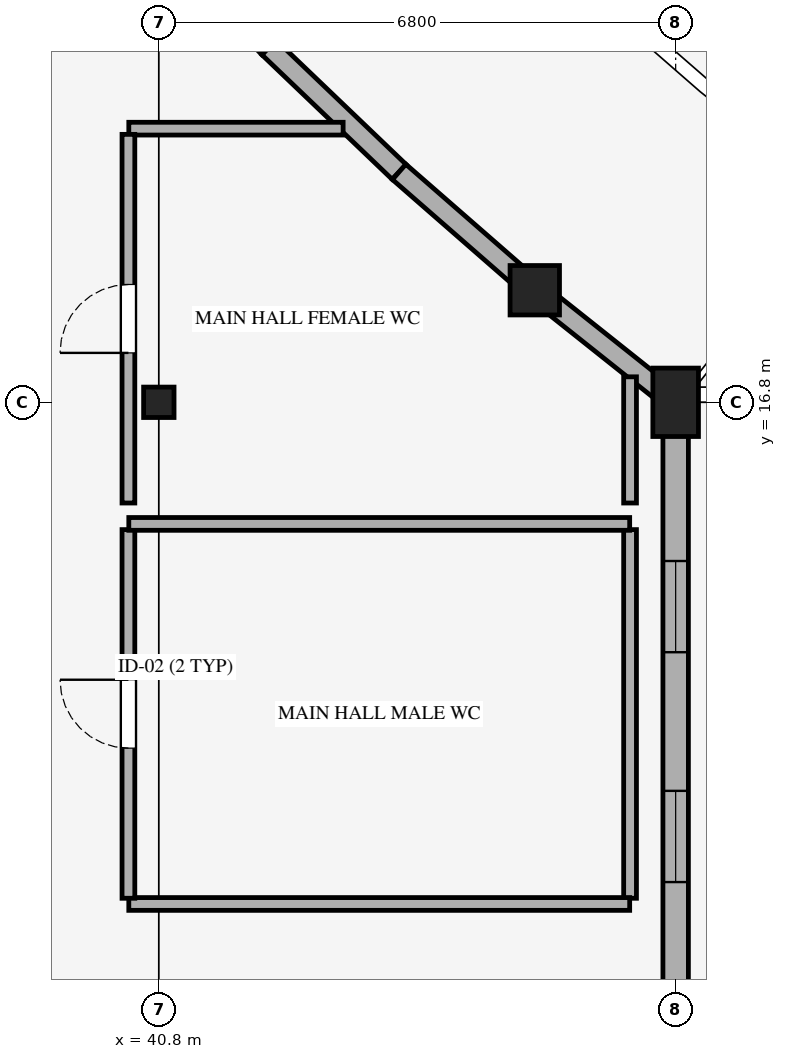
"""IFC4 building model, lengths in metres.
Left out: names, types, materials, properties, quantities, classifications, styles, units other than length and angle.
Written with IfcOpenShell. Run it as: python <this file> out.ifc"""

import sys

from ifc_helpers import new_model, si_unit, direction, frame, frame_2d, origin, origin_2d, place, context, subcontext, project, spatial, rectangle, circle, i_section, extrude, element, fill, save


model = new_model("IFC4")
c1 = context("Model", 3, precision=1e-05, world=origin(), true_north=direction((0.0, 1.0)))
c2 = subcontext(c1, "Body", "Model", "MODEL_VIEW")
j1 = project(units=[si_unit("LENGTHUNIT", "METRE"), si_unit("PLANEANGLEUNIT", "RADIAN")], contexts=[c1])
p1 = place(None, origin())
s1 = spatial("IfcSite", under=j1, at=p1, CompositionType="ELEMENT")
p2 = place(p1, origin())
s2 = spatial("IfcBuilding", under=s1, at=p2, CompositionType="ELEMENT")
p3 = place(p2, origin())
s3 = spatial("IfcBuildingStorey", under=s2, at=p3, CompositionType="ELEMENT", Elevation=0.0)
p4 = place(p3, frame((40.8, 16.8, 0.0), z_axis=(0.0, 0.0, 1.0), x_axis=(1.0, 0.0, 0.0)))
e1 = element("IfcColumn", 1, at=p4, inside=s3, PredefinedType="COLUMN", context=c2, shape_type="SweptSolid", body=[
    extrude(i_section(OverallWidth=0.4, OverallDepth=0.4, WebThickness=0.013, FlangeThickness=0.021, FilletRadius=0.022, at=origin_2d()), origin(), (0.0, 0.0, 1.0), 4.8),
])
p5 = place(p3, frame((45.746, 18.274, 0.0), z_axis=(0.0, 0.0, 1.0), x_axis=(1.0, 0.0, 0.0)))
e2 = element("IfcColumn", 2, at=p5, inside=s3, PredefinedType="COLUMN", context=c2, shape_type="SweptSolid", body=[
    extrude(circle(Radius=0.325, at=origin_2d()), origin(), (0.0, 0.0, 1.0), 4.8),
])
p6 = place(p3, frame((47.6, 16.8, 0.0), z_axis=(0.0, 0.0, 1.0), x_axis=(1.0, 0.0, 0.0)))
e3 = element("IfcColumn", 3, at=p6, inside=s3, PredefinedType="COLUMN", context=c2, shape_type="SweptSolid", body=[
    extrude(rectangle(XDim=0.6, YDim=0.9, at=origin_2d()), origin(), (0.0, 0.0, 1.0), 4.8),
])
p7 = place(p3, frame((40.615, 23.181, 0.0), z_axis=(0.0, 0.0, 1.0), x_axis=(0.690578715077, -0.723257242123, 0.0)))
e4 = element("IfcWall", 4, at=p7, inside=s3, PredefinedType="STANDARD", context=c2, shape_type="SweptSolid", body=[
    extrude(rectangle(XDim=2.368, YDim=0.268, at=frame_2d((1.184, 0.0))), origin(), (0.0, 0.0, 1.0), 3.82),
])
p8 = place(p3, frame((42.25, 21.468, 0.0), z_axis=(0.0, 0.0, 1.0), x_axis=(0.722803022189, -0.691054115909, 0.0)))
e5 = element("IfcWall", 5, at=p8, inside=s3, PredefinedType="STANDARD", context=c2, shape_type="SweptSolid", body=[
    extrude(rectangle(XDim=2.368, YDim=0.268, at=frame_2d((1.184, 0.0))), origin(), (0.0, 0.0, 1.0), 4.52),
])
p9 = place(p3, frame((43.962, 19.831, 0.0), z_axis=(0.0, 0.0, 1.0), x_axis=(0.753463654821, -0.657489559509, 0.0)))
e6 = element("IfcWall", 6, at=p9, inside=s3, PredefinedType="STANDARD", context=c2, shape_type="SweptSolid", body=[
    extrude(rectangle(XDim=2.368, YDim=0.268, at=frame_2d((1.184, 0.0))), origin(), (0.0, 0.0, 1.0), 3.9),
])
p10 = place(p3, frame((45.746, 18.274, 0.0), z_axis=(0.0, 0.0, 1.0), x_axis=(0.782695778101, -0.622404465715, 0.0)))
e7 = element("IfcWall", 7, at=p10, inside=s3, PredefinedType="STANDARD", context=c2, shape_type="SweptSolid", body=[
    extrude(rectangle(XDim=2.368, YDim=0.268, at=frame_2d((1.184, 0.0))), origin(), (0.0, 0.0, 1.0), 3.62),
])
p11 = place(p3, frame((47.6, 16.8, 0.0), z_axis=(0.0, 0.0, 1.0), x_axis=(0.0, -1.0, 0.0)))
e8 = element("IfcWall", 8, at=p11, inside=s3, PredefinedType="STANDARD", context=c2, shape_type="SweptSolid", body=[
    extrude(rectangle(XDim=8.4, YDim=0.335, at=frame_2d((4.2, 0.0))), origin(), (0.0, 0.0, 1.0), 3.62),
])
p12 = place(p11, frame((2.088, 0.0, 1.5)))
e9 = element("IfcOpeningElement", 9, at=p12, cuts=e8, PredefinedType="OPENING", context=c2, shape_type="SweptSolid", body=[
    extrude(rectangle(XDim=1.2, YDim=1.05, at=frame_2d((0.6, 0.525))), frame((0.0, 0.177, 0.0), z_axis=(0.0, -1.0, 0.0), x_axis=(1.0, 0.0, 0.0)), (0.0, 0.0, 1.0), 0.355),
])
p13 = place(p11, frame((5.112, 0.0, 1.5)))
e10 = element("IfcOpeningElement", 10, at=p13, cuts=e8, PredefinedType="OPENING", context=c2, shape_type="SweptSolid", body=[
    extrude(rectangle(XDim=1.2, YDim=1.05, at=frame_2d((0.6, 0.525))), frame((0.0, 0.177, 0.0), z_axis=(0.0, -1.0, 0.0), x_axis=(1.0, 0.0, 0.0)), (0.0, 0.0, 1.0), 0.355),
])
p14 = place(p3, frame((47.0, 15.125, 0.0), z_axis=(0.0, 0.0, 1.0), x_axis=(0.0, -1.0, 0.0)))
e11 = element("IfcWall", 11, at=p14, inside=s3, PredefinedType="STANDARD", context=c2, shape_type="SweptSolid", body=[
    extrude(rectangle(XDim=4.85, YDim=0.168, at=frame_2d((2.425, 0.0))), origin(), (0.0, 0.0, 1.0), 4.49),
])
p15 = place(p3, frame((46.995, 10.2, 0.0), z_axis=(0.0, 0.0, 1.0), x_axis=(-1.0, 0.0, 0.0)))
e12 = element("IfcWall", 12, at=p15, inside=s3, PredefinedType="STANDARD", context=c2, shape_type="SweptSolid", body=[
    extrude(rectangle(XDim=6.59, YDim=0.168, at=frame_2d((3.295, 0.0))), origin(), (0.0, 0.0, 1.0), 4.02),
])
p16 = place(p3, frame((40.4, 10.275, 0.0), z_axis=(0.0, 0.0, 1.0), x_axis=(0.0, 1.0, 0.0)))
e13 = element("IfcWall", 13, at=p16, inside=s3, PredefinedType="STANDARD", context=c2, shape_type="SweptSolid", body=[
    extrude(rectangle(XDim=4.85, YDim=0.168, at=frame_2d((2.425, 0.0))), origin(), (0.0, 0.0, 1.0), 4.49),
])
p17 = place(p16, frame((1.975, 0.0, 0.0)))
e14 = element("IfcOpeningElement", 14, at=p17, cuts=e13, PredefinedType="OPENING", context=c2, shape_type="SweptSolid", body=[
    extrude(rectangle(XDim=0.9, YDim=2.1, at=frame_2d((0.45, 1.05))), frame((0.0, 0.094, 0.0), z_axis=(0.0, -1.0, 0.0), x_axis=(1.0, 0.0, 0.0)), (0.0, 0.0, 1.0), 0.188),
])
p18 = place(p3, frame((40.405, 15.2, 0.0), z_axis=(0.0, 0.0, 1.0), x_axis=(1.0, 0.0, 0.0)))
e15 = element("IfcWall", 15, at=p18, inside=s3, PredefinedType="STANDARD", context=c2, shape_type="SweptSolid", body=[
    extrude(rectangle(XDim=6.59, YDim=0.168, at=frame_2d((3.295, 0.0))), origin(), (0.0, 0.0, 1.0), 4.02),
])
p19 = place(p3, frame((40.405, 20.4, 0.0), z_axis=(0.0, 0.0, 1.0), x_axis=(1.0, 0.0, 0.0)))
e16 = element("IfcWall", 16, at=p19, inside=s3, PredefinedType="STANDARD", context=c2, shape_type="SweptSolid", body=[
    extrude(rectangle(XDim=2.82, YDim=0.168, at=frame_2d((1.41, 0.0))), origin(), (0.0, 0.0, 1.0), 3.87),
])
p20 = place(p3, frame((47.0, 17.135, 0.0), z_axis=(0.0, 0.0, 1.0), x_axis=(0.0, -1.0, 0.0)))
e17 = element("IfcWall", 17, at=p20, inside=s3, PredefinedType="STANDARD", context=c2, shape_type="SweptSolid", body=[
    extrude(rectangle(XDim=1.66, YDim=0.168, at=frame_2d((0.83, 0.0))), origin(), (0.0, 0.0, 1.0), 3.62),
])
p21 = place(p3, frame((40.4, 15.475, 0.0), z_axis=(0.0, 0.0, 1.0), x_axis=(0.0, 1.0, 0.0)))
e18 = element("IfcWall", 18, at=p21, inside=s3, PredefinedType="STANDARD", context=c2, shape_type="SweptSolid", body=[
    extrude(rectangle(XDim=4.85, YDim=0.168, at=frame_2d((2.425, 0.0))), origin(), (0.0, 0.0, 1.0), 3.62),
])
p22 = place(p21, frame((1.975, 0.0, 0.0)))
e19 = element("IfcOpeningElement", 19, at=p22, cuts=e18, PredefinedType="OPENING", context=c2, shape_type="SweptSolid", body=[
    extrude(rectangle(XDim=0.9, YDim=2.1, at=frame_2d((0.45, 1.05))), frame((0.0, 0.094, 0.0), z_axis=(0.0, -1.0, 0.0), x_axis=(1.0, 0.0, 0.0)), (0.0, 0.0, 1.0), 0.188),
])
p23 = place(p12, origin())
e20 = element("IfcWindow", 20, at=p23, inside=s3, PartitioningType="SINGLE_PANEL", PredefinedType="WINDOW", context=c2, shape_type="SweptSolid", body=[
    extrude(rectangle(XDim=1.2, YDim=1.05, at=frame_2d((0.6, 0.525))), frame((0.0, 0.03, 0.0), z_axis=(0.0, -1.0, 0.0), x_axis=(1.0, 0.0, 0.0)), (0.0, 0.0, 1.0), 0.06),
])
fill(e9, e20)
p24 = place(p13, origin())
e21 = element("IfcWindow", 21, at=p24, inside=s3, PartitioningType="SINGLE_PANEL", PredefinedType="WINDOW", context=c2, shape_type="SweptSolid", body=[
    extrude(rectangle(XDim=1.2, YDim=1.05, at=frame_2d((0.6, 0.525))), frame((0.0, 0.03, 0.0), z_axis=(0.0, -1.0, 0.0), x_axis=(1.0, 0.0, 0.0)), (0.0, 0.0, 1.0), 0.06),
])
fill(e10, e21)
p25 = place(p17, origin())
e22 = element("IfcDoor", 22, at=p25, inside=s3, OperationType="SINGLE_SWING_RIGHT", PredefinedType="DOOR", context=c2, shape_type="SweptSolid", body=[
    extrude(rectangle(XDim=0.9, YDim=2.1, at=frame_2d((0.45, 1.05))), frame((0.0, 0.025, 0.0), z_axis=(0.0, -1.0, 0.0), x_axis=(1.0, 0.0, 0.0)), (0.0, 0.0, 1.0), 0.05),
])
fill(e14, e22)
p26 = place(p22, origin())
e23 = element("IfcDoor", 23, at=p26, inside=s3, OperationType="SINGLE_SWING_LEFT", PredefinedType="DOOR", context=c2, shape_type="SweptSolid", body=[
    extrude(rectangle(XDim=0.9, YDim=2.1, at=frame_2d((0.45, 1.05))), frame((0.0, 0.025, 0.0), z_axis=(0.0, -1.0, 0.0), x_axis=(1.0, 0.0, 0.0)), (0.0, 0.0, 1.0), 0.05),
])
fill(e19, e23)
save(model, sys.argv[1])
